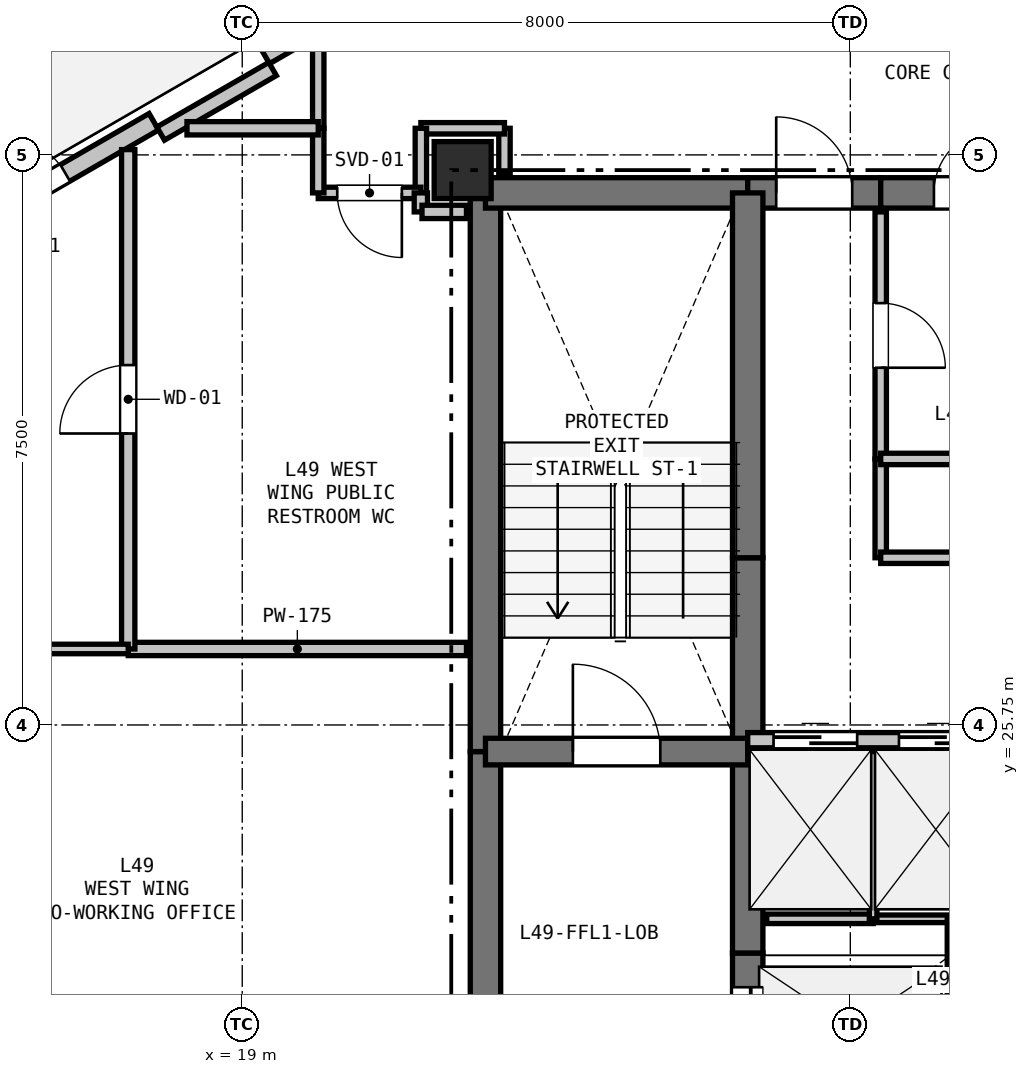
"""IFC4 building model, lengths in metres.
Left out: names, types, materials, properties, quantities, classifications, styles, units other than length and angle.
Written with IfcOpenShell. Run it as: python <this file> out.ifc"""

import sys

from ifc_helpers import new_model, si_unit, direction, frame, frame_2d, origin, origin_2d, place, context, subcontext, project, spatial, rectangle, extrude, element, fill, save


model = new_model("IFC4")
c1 = context("Model", 3, precision=1e-05, world=origin(), true_north=direction((0.0, 1.0)))
c2 = subcontext(c1, "Body", "Model", "MODEL_VIEW")
j1 = project(units=[si_unit("LENGTHUNIT", "METRE"), si_unit("PLANEANGLEUNIT", "RADIAN")], contexts=[c1])
p1 = place(None, origin())
s1 = spatial("IfcSite", under=j1, at=p1, CompositionType="ELEMENT")
p2 = place(p1, origin())
s2 = spatial("IfcBuilding", under=s1, at=p2, CompositionType="ELEMENT")
p3 = place(p2, frame((0.0, 0.0, 178.8)))
s3 = spatial("IfcBuildingStorey", under=s2, at=p3, CompositionType="ELEMENT", Elevation=178.8)
p4 = place(p3, frame((21.9, 33.05, 0.0), z_axis=(0.0, 0.0, 1.0), x_axis=(1.0, 0.0, 0.0)))
e1 = element("IfcColumn", 1, at=p4, inside=s3, PredefinedType="COLUMN", context=c2, shape_type="SweptSolid", body=[
    extrude(rectangle(XDim=0.75, YDim=0.75, at=origin_2d()), origin(), (0.0, 0.0, 1.0), 3.3),
])
p5 = place(p3, frame((9.438, 28.837, 0.0), z_axis=(0.0, 0.0, 1.0), x_axis=(0.866027133173, 0.499997004599, 0.0)))
e2 = element("IfcWall", 2, at=p5, inside=s3, PredefinedType="SOLIDWALL", context=c2, shape_type="SweptSolid", body=[
    extrude(rectangle(XDim=9.699, YDim=0.25, at=frame_2d((4.849, 0.0))), origin(), (0.0, 0.0, 1.0), 2.69),
])
p6 = place(p5, frame((7.352, 0.0, 0.0)))
e3 = element("IfcOpeningElement", 3, at=p6, cuts=e2, PredefinedType="OPENING", context=c2, shape_type="SweptSolid", body=[
    extrude(rectangle(XDim=1.0, YDim=2.1, at=frame_2d((0.5, 1.05))), frame((0.0, 0.135, 0.0), z_axis=(0.0, -1.0, 0.0), x_axis=(1.0, 0.0, 0.0)), (0.0, 0.0, 1.0), 0.27),
])
p7 = place(p3, frame((19.309, 34.536, 0.0), z_axis=(0.0, 0.0, 1.0), x_axis=(0.866020680503, 0.500008180874, 0.0)))
e4 = element("IfcWall", 4, at=p7, inside=s3, PredefinedType="PARAPET", context=c2, shape_type="SweptSolid", body=[
    extrude(rectangle(XDim=8.999, YDim=0.2, at=frame_2d((4.5, 0.0))), origin(), (0.0, 0.0, 1.0), 0.2),
])
p8 = place(p3, frame((17.927, 33.53, 0.0), z_axis=(0.0, 0.0, 1.0), x_axis=(0.86605165483, 0.499954529098, 0.0)))
e5 = element("IfcWall", 5, at=p8, inside=s3, PredefinedType="PARAPET", context=c2, shape_type="SweptSolid", body=[
    extrude(rectangle(XDim=1.7, YDim=0.2, at=frame_2d((0.85, 0.0))), origin(), (0.0, 0.0, 1.0), 2.69),
])
p9 = place(p3, frame((17.837, 19.814, 0.0), z_axis=(0.0, 0.0, 1.0), x_axis=(-0.866027133173, 0.499997004599, 0.0)))
e6 = element("IfcWall", 6, at=p9, inside=s3, PredefinedType="SOLIDWALL", context=c2, shape_type="SweptSolid", body=[
    extrude(rectangle(XDim=9.699, YDim=0.25, at=frame_2d((4.849, 0.0))), origin(), (0.0, 0.0, 1.0), 2.69),
])
p10 = place(p3, frame((22.2, 20.75, 0.0), z_axis=(0.0, 0.0, 1.0), x_axis=(0.0, 1.0, 0.0)))
e7 = element("IfcWall", 7, at=p10, inside=s3, PredefinedType="SHEAR", context=c2, shape_type="SweptSolid", body=[
    extrude(rectangle(XDim=4.65, YDim=0.4, at=frame_2d((2.325, 0.0))), origin(), (0.0, 0.0, 1.0), 3.07),
])
p11 = place(p3, frame((22.2, 25.4, 0.0), z_axis=(0.0, 0.0, 1.0), x_axis=(0.0, 1.0, 0.0)))
e8 = element("IfcWall", 8, at=p11, inside=s3, PredefinedType="SHEAR", context=c2, shape_type="SweptSolid", body=[
    extrude(rectangle(XDim=7.35, YDim=0.4, at=frame_2d((3.675, 0.0))), origin(), (0.0, 0.0, 1.0), 3.07),
])
p12 = place(p3, frame((22.2, 32.75, 0.0), z_axis=(0.0, 0.0, 1.0), x_axis=(1.0, 0.0, 0.0)))
e9 = element("IfcWall", 9, at=p12, inside=s3, PredefinedType="SHEAR", context=c2, shape_type="SweptSolid", body=[
    extrude(rectangle(XDim=3.45, YDim=0.4, at=frame_2d((1.725, 0.0))), origin(), (0.0, 0.0, 1.0), 3.07),
])
p13 = place(p3, frame((25.65, 32.75, 0.0), z_axis=(0.0, 0.0, 1.0), x_axis=(1.0, 0.0, 0.0)))
e10 = element("IfcWall", 10, at=p13, inside=s3, PredefinedType="SHEAR", context=c2, shape_type="SweptSolid", body=[
    extrude(rectangle(XDim=1.75, YDim=0.4, at=frame_2d((0.875, 0.0))), origin(), (0.0, 0.0, 1.0), 3.07),
])
p14 = place(p13, frame((0.375, 0.0, 0.0)))
e11 = element("IfcOpeningElement", 11, at=p14, cuts=e10, PredefinedType="OPENING", context=c2, shape_type="SweptSolid", body=[
    extrude(rectangle(XDim=1.0, YDim=2.15, at=frame_2d((0.5, 1.075))), frame((0.0, 0.21, 0.0), z_axis=(0.0, -1.0, 0.0), x_axis=(1.0, 0.0, 0.0)), (0.0, 0.0, 1.0), 0.42),
])
p15 = place(p3, frame((27.4, 32.75, 0.0), z_axis=(0.0, 0.0, 1.0), x_axis=(1.0, 0.0, 0.0)))
e12 = element("IfcWall", 12, at=p15, inside=s3, PredefinedType="SHEAR", context=c2, shape_type="SweptSolid", body=[
    extrude(rectangle(XDim=2.25, YDim=0.4, at=frame_2d((1.125, 0.0))), origin(), (0.0, 0.0, 1.0), 3.07),
])
p16 = place(p15, frame((0.7, 0.0, 0.0)))
e13 = element("IfcOpeningElement", 13, at=p16, cuts=e12, PredefinedType="OPENING", context=c2, shape_type="SweptSolid", body=[
    extrude(rectangle(XDim=0.85, YDim=2.1, at=frame_2d((0.425, 1.05))), frame((0.0, 0.21, 0.0), z_axis=(0.0, -1.0, 0.0), x_axis=(1.0, 0.0, 0.0)), (0.0, 0.0, 1.0), 0.42),
])
p17 = place(p3, frame((25.65, 20.75, 0.0), z_axis=(0.0, 0.0, 1.0), x_axis=(0.0, 1.0, 0.0)))
e14 = element("IfcWall", 14, at=p17, inside=s3, PredefinedType="SHEAR", context=c2, shape_type="SweptSolid", body=[
    extrude(rectangle(XDim=2.0, YDim=0.4, at=frame_2d((1.0, 0.0))), origin(), (0.0, 0.0, 1.0), 3.07),
])
p18 = place(p17, frame((0.45, 0.0, 0.0)))
e15 = element("IfcOpeningElement", 15, at=p18, cuts=e14, PredefinedType="OPENING", context=c2, shape_type="SweptSolid", body=[
    extrude(rectangle(XDim=1.1, YDim=2.15, at=frame_2d((0.55, 1.075))), frame((0.0, 0.21, 0.0), z_axis=(0.0, -1.0, 0.0), x_axis=(1.0, 0.0, 0.0)), (0.0, 0.0, 1.0), 0.42),
])
p19 = place(p3, frame((25.65, 22.75, 0.0), z_axis=(0.0, 0.0, 1.0), x_axis=(0.0, 1.0, 0.0)))
e16 = element("IfcWall", 16, at=p19, inside=s3, PredefinedType="SHEAR", context=c2, shape_type="SweptSolid", body=[
    extrude(rectangle(XDim=2.8, YDim=0.4, at=frame_2d((1.4, 0.0))), origin(), (0.0, 0.0, 1.0), 3.07),
])
p20 = place(p3, frame((25.65, 25.55, 0.0), z_axis=(0.0, 0.0, 1.0), x_axis=(0.0, 1.0, 0.0)))
e17 = element("IfcWall", 17, at=p20, inside=s3, PredefinedType="SHEAR", context=c2, shape_type="SweptSolid", body=[
    extrude(rectangle(XDim=2.4, YDim=0.4, at=frame_2d((1.2, 0.0))), origin(), (0.0, 0.0, 1.0), 3.07),
])
p21 = place(p3, frame((25.65, 27.95, 0.0), z_axis=(0.0, 0.0, 1.0), x_axis=(0.0, 1.0, 0.0)))
e18 = element("IfcWall", 18, at=p21, inside=s3, PredefinedType="SHEAR", context=c2, shape_type="SweptSolid", body=[
    extrude(rectangle(XDim=4.8, YDim=0.4, at=frame_2d((2.4, 0.0))), origin(), (0.0, 0.0, 1.0), 3.07),
])
p22 = place(p3, frame((22.2, 25.4, 0.0), z_axis=(0.0, 0.0, 1.0), x_axis=(1.0, 0.0, 0.0)))
e19 = element("IfcWall", 19, at=p22, inside=s3, PredefinedType="SHEAR", context=c2, shape_type="SweptSolid", body=[
    extrude(rectangle(XDim=3.45, YDim=0.35, at=frame_2d((1.725, 0.0))), origin(), (0.0, 0.0, 1.0), 3.07),
])
p23 = place(p22, frame((1.15, 0.0, 0.0)))
e20 = element("IfcOpeningElement", 20, at=p23, cuts=e19, PredefinedType="OPENING", context=c2, shape_type="SweptSolid", body=[
    extrude(rectangle(XDim=1.15, YDim=2.15, at=frame_2d((0.575, 1.075))), frame((0.0, 0.185, 0.0), z_axis=(0.0, -1.0, 0.0), x_axis=(1.0, 0.0, 0.0)), (0.0, 0.0, 1.0), 0.37),
])
p24 = place(p3, frame((25.65, 25.55, 0.0), z_axis=(0.0, 0.0, 1.0), x_axis=(1.0, 0.0, 0.0)))
e21 = element("IfcWall", 21, at=p24, inside=s3, PredefinedType="PARTITIONING", context=c2, shape_type="SweptSolid", body=[
    extrude(rectangle(XDim=4.95, YDim=0.2, at=frame_2d((2.475, 0.0))), origin(), (0.0, 0.0, 1.0), 3.07),
])
p25 = place(p24, frame((0.34, 0.0, 0.0)))
e22 = element("IfcOpeningElement", 22, at=p25, cuts=e21, PredefinedType="OPENING", context=c2, shape_type="SweptSolid", body=[
    extrude(rectangle(XDim=1.1, YDim=2.15, at=frame_2d((0.55, 1.075))), frame((0.0, 0.11, 0.0), z_axis=(0.0, -1.0, 0.0), x_axis=(1.0, 0.0, 0.0)), (0.0, 0.0, 1.0), 0.22),
])
p26 = place(p24, frame((1.99, 0.0, 0.0)))
e23 = element("IfcOpeningElement", 23, at=p26, cuts=e21, PredefinedType="OPENING", context=c2, shape_type="SweptSolid", body=[
    extrude(rectangle(XDim=1.1, YDim=2.15, at=frame_2d((0.55, 1.075))), frame((0.0, 0.11, 0.0), z_axis=(0.0, -1.0, 0.0), x_axis=(1.0, 0.0, 0.0)), (0.0, 0.0, 1.0), 0.22),
])
p27 = place(p24, frame((3.64, 0.0, 0.0)))
e24 = element("IfcOpeningElement", 24, at=p27, cuts=e21, PredefinedType="OPENING", context=c2, shape_type="SweptSolid", body=[
    extrude(rectangle(XDim=1.1, YDim=2.15, at=frame_2d((0.55, 1.075))), frame((0.0, 0.11, 0.0), z_axis=(0.0, -1.0, 0.0), x_axis=(1.0, 0.0, 0.0)), (0.0, 0.0, 1.0), 0.22),
])
p28 = place(p3, frame((25.9, 23.2, 0.0), z_axis=(0.0, 0.0, 1.0), x_axis=(1.0, 0.0, 0.0)))
e25 = element("IfcWall", 25, at=p28, inside=s3, PredefinedType="PARTITIONING", context=c2, shape_type="SweptSolid", body=[
    extrude(rectangle(XDim=1.4, YDim=0.125, at=frame_2d((0.7, 0.0))), origin(), (0.0, 0.0, 1.0), 3.07),
])
p29 = place(p3, frame((27.3, 23.2, 0.0), z_axis=(0.0, 0.0, 1.0), x_axis=(1.0, 0.0, 0.0)))
e26 = element("IfcWall", 26, at=p29, inside=s3, PredefinedType="PARTITIONING", context=c2, shape_type="SweptSolid", body=[
    extrude(rectangle(XDim=1.05, YDim=0.1, at=frame_2d((0.525, 0.0))), origin(), (0.0, 0.0, 1.0), 3.07),
])
p30 = place(p3, frame((28.35, 23.2, 0.0), z_axis=(0.0, 0.0, 1.0), x_axis=(0.0, -1.0, 0.0)))
e27 = element("IfcWall", 27, at=p30, inside=s3, PredefinedType="PARTITIONING", context=c2, shape_type="SweptSolid", body=[
    extrude(rectangle(XDim=2.2, YDim=0.15, at=frame_2d((1.1, 0.0))), origin(), (0.0, 0.0, 1.0), 3.07),
])
p31 = place(p3, frame((27.3, 25.4, 0.0), z_axis=(0.0, 0.0, 1.0), x_axis=(0.0, -1.0, 0.0)))
e28 = element("IfcWall", 28, at=p31, inside=s3, PredefinedType="PARTITIONING", context=c2, shape_type="SweptSolid", body=[
    extrude(rectangle(XDim=2.2, YDim=0.1, at=frame_2d((1.1, 0.0))), origin(), (0.0, 0.0, 1.0), 3.07),
])
p32 = place(p3, frame((27.4, 32.5, 0.0), z_axis=(0.0, 0.0, 1.0), x_axis=(0.0, -1.0, 0.0)))
e29 = element("IfcWall", 29, at=p32, inside=s3, PredefinedType="PARTITIONING", context=c2, shape_type="SweptSolid", body=[
    extrude(rectangle(XDim=3.25, YDim=0.15, at=frame_2d((1.625, 0.0))), origin(), (0.0, 0.0, 1.0), 3.07),
])
p33 = place(p32, frame((1.2, 0.0, 0.0)))
e30 = element("IfcOpeningElement", 30, at=p33, cuts=e29, PredefinedType="OPENING", context=c2, shape_type="SweptSolid", body=[
    extrude(rectangle(XDim=0.85, YDim=2.1, at=frame_2d((0.425, 1.05))), frame((0.0, 0.085, 0.0), z_axis=(0.0, -1.0, 0.0), x_axis=(1.0, 0.0, 0.0)), (0.0, 0.0, 1.0), 0.17),
])
p34 = place(p3, frame((27.4, 29.25, 0.0), z_axis=(0.0, 0.0, 1.0), x_axis=(0.0, -1.0, 0.0)))
e31 = element("IfcWall", 31, at=p34, inside=s3, PredefinedType="PARTITIONING", context=c2, shape_type="SweptSolid", body=[
    extrude(rectangle(XDim=1.3, YDim=0.15, at=frame_2d((0.65, 0.0))), origin(), (0.0, 0.0, 1.0), 3.07),
])
p35 = place(p3, frame((27.4, 27.95, 0.0), z_axis=(0.0, 0.0, 1.0), x_axis=(1.0, 0.0, 0.0)))
e32 = element("IfcWall", 32, at=p35, inside=s3, PredefinedType="PARTITIONING", context=c2, shape_type="SweptSolid", body=[
    extrude(rectangle(XDim=4.7, YDim=0.15, at=frame_2d((2.35, 0.0))), origin(), (0.0, 0.0, 1.0), 3.07),
])
p36 = place(p35, frame((1.85, 0.0, 0.0)))
e33 = element("IfcOpeningElement", 33, at=p36, cuts=e32, PredefinedType="OPENING", context=c2, shape_type="SweptSolid", body=[
    extrude(rectangle(XDim=1.0, YDim=2.15, at=frame_2d((0.5, 1.075))), frame((0.0, 0.085, 0.0), z_axis=(0.0, -1.0, 0.0), x_axis=(1.0, 0.0, 0.0)), (0.0, 0.0, 1.0), 0.17),
])
p37 = place(p3, frame((22.45, 33.0, 0.0), z_axis=(0.0, 0.0, 1.0), x_axis=(0.0, 1.0, 0.0)))
e34 = element("IfcWall", 34, at=p37, inside=s3, PredefinedType="PARTITIONING", context=c2, shape_type="SweptSolid", body=[
    extrude(rectangle(XDim=0.6, YDim=0.15, at=frame_2d((0.3, 0.0))), origin(), (0.0, 0.0, 1.0), 2.595),
])
p38 = place(p3, frame((22.45, 33.6, 0.0), z_axis=(0.0, 0.0, 1.0), x_axis=(-1.0, 0.0, 0.0)))
e35 = element("IfcWall", 35, at=p38, inside=s3, PredefinedType="PARTITIONING", context=c2, shape_type="SweptSolid", body=[
    extrude(rectangle(XDim=1.1, YDim=0.15, at=frame_2d((0.55, 0.0))), origin(), (0.0, 0.0, 1.0), 3.07),
])
p39 = place(p3, frame((21.35, 33.6, 0.0), z_axis=(0.0, 0.0, 1.0), x_axis=(0.0, -1.0, 0.0)))
e36 = element("IfcWall", 36, at=p39, inside=s3, PredefinedType="PARTITIONING", context=c2, shape_type="SweptSolid", body=[
    extrude(rectangle(XDim=0.85, YDim=0.15, at=frame_2d((0.425, 0.0))), origin(), (0.0, 0.0, 1.0), 2.518),
])
p40 = place(p3, frame((21.35, 32.75, 0.0), z_axis=(0.0, 0.0, 1.0), x_axis=(-1.0, 0.0, 0.0)))
e37 = element("IfcWall", 37, at=p40, inside=s3, PredefinedType="PARTITIONING", context=c2, shape_type="SweptSolid", body=[
    extrude(rectangle(XDim=1.35, YDim=0.15, at=frame_2d((0.675, 0.0))), origin(), (0.0, 0.0, 1.0), 2.518),
])
p41 = place(p40, frame((0.25, 0.0, 0.0)))
e38 = element("IfcOpeningElement", 38, at=p41, cuts=e37, PredefinedType="OPENING", context=c2, shape_type="SweptSolid", body=[
    extrude(rectangle(XDim=0.85, YDim=2.1, at=frame_2d((0.425, 1.05))), frame((0.0, 0.085, 0.0), z_axis=(0.0, -1.0, 0.0), x_axis=(1.0, 0.0, 0.0)), (0.0, 0.0, 1.0), 0.17),
])
p42 = place(p3, frame((20.0, 32.75, 0.0), z_axis=(0.0, 0.0, 1.0), x_axis=(0.0, 1.0, 0.0)))
e39 = element("IfcWall", 39, at=p42, inside=s3, PredefinedType="PARTITIONING", context=c2, shape_type="SweptSolid", body=[
    extrude(rectangle(XDim=0.85, YDim=0.15, at=frame_2d((0.425, 0.0))), origin(), (0.0, 0.0, 1.0), 3.07),
])
p43 = place(p3, frame((20.0, 33.6, 0.0), z_axis=(0.0, 0.0, 1.0), x_axis=(0.0, 1.0, 0.0)))
e40 = element("IfcWall", 40, at=p43, inside=s3, PredefinedType="PARTITIONING", context=c2, shape_type="SweptSolid", body=[
    extrude(rectangle(XDim=1.291, YDim=0.15, at=frame_2d((0.646, 0.0))), origin(), (0.0, 0.0, 1.0), 2.365),
])
p44 = place(p3, frame((21.35, 32.75, 0.0), z_axis=(0.0, 0.0, 1.0), x_axis=(0.0, -1.0, 0.0)))
e41 = element("IfcWall", 41, at=p44, inside=s3, PredefinedType="PLUMBINGWALL", context=c2, shape_type="SweptSolid", body=[
    extrude(rectangle(XDim=0.25, YDim=0.175, at=frame_2d((0.125, 0.0))), origin(), (0.0, 0.0, 1.0), 3.07),
])
p45 = place(p3, frame((21.365, 32.5, 0.0), z_axis=(0.0, 0.0, 1.0), x_axis=(1.0, 0.0, 0.0)))
e42 = element("IfcWall", 42, at=p45, inside=s3, PredefinedType="PLUMBINGWALL", context=c2, shape_type="SweptSolid", body=[
    extrude(rectangle(XDim=0.585, YDim=0.175, at=frame_2d((0.292, 0.0))), origin(), (0.0, 0.0, 1.0), 2.595),
])
p46 = place(p3, frame((21.95, 26.75, 0.0), z_axis=(0.0, 0.0, 1.0), x_axis=(-1.0, 0.0, 0.0)))
e43 = element("IfcWall", 43, at=p46, inside=s3, PredefinedType="PLUMBINGWALL", context=c2, shape_type="SweptSolid", body=[
    extrude(rectangle(XDim=4.45, YDim=0.175, at=frame_2d((2.225, 0.0))), origin(), (0.0, 0.0, 1.0), 2.595),
])
p47 = place(p3, frame((17.5, 26.75, 0.0), z_axis=(0.0, 0.0, 1.0), x_axis=(0.0, 1.0, 0.0)))
e44 = element("IfcWall", 44, at=p47, inside=s3, PredefinedType="PLUMBINGWALL", context=c2, shape_type="SweptSolid", body=[
    extrude(rectangle(XDim=6.57, YDim=0.175, at=frame_2d((3.285, 0.0))), origin(), (0.0, 0.0, 1.0), 2.365),
])
p48 = place(p47, frame((2.835, 0.0, 0.0)))
e45 = element("IfcOpeningElement", 45, at=p48, cuts=e44, PredefinedType="OPENING", context=c2, shape_type="SweptSolid", body=[
    extrude(rectangle(XDim=0.9, YDim=2.1, at=frame_2d((0.45, 1.05))), frame((0.0, 0.097, 0.0), z_axis=(0.0, -1.0, 0.0), x_axis=(1.0, 0.0, 0.0)), (0.0, 0.0, 1.0), 0.195),
])
p49 = place(p3, frame((18.273, 33.6, 0.0), z_axis=(0.0, 0.0, 1.0), x_axis=(1.0, 0.0, 0.0)))
e46 = element("IfcWall", 46, at=p49, inside=s3, PredefinedType="PLUMBINGWALL", context=c2, shape_type="SweptSolid", body=[
    extrude(rectangle(XDim=1.727, YDim=0.175, at=frame_2d((0.863, 0.0))), origin(), (0.0, 0.0, 1.0), 2.365),
])
p50 = place(p3, frame((32.1, 29.25, 0.0), z_axis=(0.0, 0.0, 1.0), x_axis=(-1.0, 0.0, 0.0)))
e47 = element("IfcWall", 47, at=p50, inside=s3, PredefinedType="PARTITIONING", context=c2, shape_type="SweptSolid", body=[
    extrude(rectangle(XDim=4.7, YDim=0.15, at=frame_2d((2.35, 0.0))), origin(), (0.0, 0.0, 1.0), 3.07),
])
p51 = place(p3, frame((17.5, 26.75, 0.0), z_axis=(0.0, 0.0, 1.0), x_axis=(-1.0, 0.0, 0.0)))
e48 = element("IfcWall", 48, at=p51, inside=s3, PredefinedType="PARTITIONING", context=c2, shape_type="SweptSolid", body=[
    extrude(rectangle(XDim=8.043, YDim=0.125, at=frame_2d((4.022, 0.0))), origin(), (0.0, 0.0, 1.0), 2.734),
])
p52 = place(p6, origin())
e49 = element("IfcDoor", 49, at=p52, inside=s3, OperationType="SINGLE_SWING_LEFT", PredefinedType="DOOR", context=c2, shape_type="SweptSolid", body=[
    extrude(rectangle(XDim=1.0, YDim=2.1, at=frame_2d((0.5, 1.05))), frame((0.0, 0.025, 0.0), z_axis=(0.0, -1.0, 0.0), x_axis=(1.0, 0.0, 0.0)), (0.0, 0.0, 1.0), 0.05),
])
fill(e3, e49)
p53 = place(p25, origin())
e50 = element("IfcDoor", 50, at=p53, inside=s3, OperationType="SLIDING_TO_LEFT", PredefinedType="DOOR", context=c2, shape_type="SweptSolid", body=[
    extrude(rectangle(XDim=1.1, YDim=2.15, at=frame_2d((0.55, 1.075))), frame((0.0, 0.025, 0.0), z_axis=(0.0, -1.0, 0.0), x_axis=(1.0, 0.0, 0.0)), (0.0, 0.0, 1.0), 0.05),
])
fill(e22, e50)
p54 = place(p26, origin())
e51 = element("IfcDoor", 51, at=p54, inside=s3, OperationType="SLIDING_TO_LEFT", PredefinedType="DOOR", context=c2, shape_type="SweptSolid", body=[
    extrude(rectangle(XDim=1.1, YDim=2.15, at=frame_2d((0.55, 1.075))), frame((0.0, 0.025, 0.0), z_axis=(0.0, -1.0, 0.0), x_axis=(1.0, 0.0, 0.0)), (0.0, 0.0, 1.0), 0.05),
])
fill(e23, e51)
p55 = place(p14, origin())
e52 = element("IfcDoor", 52, at=p55, inside=s3, OperationType="SINGLE_SWING_LEFT", PredefinedType="DOOR", context=c2, shape_type="SweptSolid", body=[
    extrude(rectangle(XDim=1.0, YDim=2.15, at=frame_2d((0.5, 1.075))), frame((0.0, 0.025, 0.0), z_axis=(0.0, -1.0, 0.0), x_axis=(1.0, 0.0, 0.0)), (0.0, 0.0, 1.0), 0.05),
])
fill(e11, e52)
p56 = place(p18, origin())
e53 = element("IfcDoor", 53, at=p56, inside=s3, OperationType="SLIDING_TO_LEFT", PredefinedType="DOOR", context=c2, shape_type="SweptSolid", body=[
    extrude(rectangle(XDim=1.1, YDim=2.15, at=frame_2d((0.55, 1.075))), frame((0.0, 0.025, 0.0), z_axis=(0.0, -1.0, 0.0), x_axis=(1.0, 0.0, 0.0)), (0.0, 0.0, 1.0), 0.05),
])
fill(e15, e53)
p57 = place(p23, origin())
e54 = element("IfcDoor", 54, at=p57, inside=s3, OperationType="SINGLE_SWING_LEFT", PredefinedType="DOOR", context=c2, shape_type="SweptSolid", body=[
    extrude(rectangle(XDim=1.15, YDim=2.15, at=frame_2d((0.575, 1.075))), frame((0.0, 0.025, 0.0), z_axis=(0.0, -1.0, 0.0), x_axis=(1.0, 0.0, 0.0)), (0.0, 0.0, 1.0), 0.05),
])
fill(e20, e54)
p58 = place(p33, origin())
e55 = element("IfcDoor", 55, at=p58, inside=s3, OperationType="SINGLE_SWING_RIGHT", PredefinedType="DOOR", context=c2, shape_type="SweptSolid", body=[
    extrude(rectangle(XDim=0.85, YDim=2.1, at=frame_2d((0.425, 1.05))), frame((0.0, 0.025, 0.0), z_axis=(0.0, -1.0, 0.0), x_axis=(1.0, 0.0, 0.0)), (0.0, 0.0, 1.0), 0.05),
])
fill(e30, e55)
p59 = place(p41, origin())
e56 = element("IfcDoor", 56, at=p59, inside=s3, OperationType="SINGLE_SWING_LEFT", PredefinedType="DOOR", context=c2, shape_type="SweptSolid", body=[
    extrude(rectangle(XDim=0.85, YDim=2.1, at=frame_2d((0.425, 1.05))), frame((0.0, 0.025, 0.0), z_axis=(0.0, -1.0, 0.0), x_axis=(1.0, 0.0, 0.0)), (0.0, 0.0, 1.0), 0.05),
])
fill(e38, e56)
p60 = place(p16, origin())
e57 = element("IfcDoor", 57, at=p60, inside=s3, OperationType="SINGLE_SWING_RIGHT", PredefinedType="DOOR", context=c2, shape_type="SweptSolid", body=[
    extrude(rectangle(XDim=0.85, YDim=2.1, at=frame_2d((0.425, 1.05))), frame((0.0, 0.025, 0.0), z_axis=(0.0, -1.0, 0.0), x_axis=(1.0, 0.0, 0.0)), (0.0, 0.0, 1.0), 0.05),
])
fill(e13, e57)
p61 = place(p48, origin())
e58 = element("IfcDoor", 58, at=p61, inside=s3, OperationType="SINGLE_SWING_LEFT", PredefinedType="DOOR", context=c2, shape_type="SweptSolid", body=[
    extrude(rectangle(XDim=0.9, YDim=2.1, at=frame_2d((0.45, 1.05))), frame((0.0, 0.025, 0.0), z_axis=(0.0, -1.0, 0.0), x_axis=(1.0, 0.0, 0.0)), (0.0, 0.0, 1.0), 0.05),
])
fill(e45, e58)
save(model, sys.argv[1])
